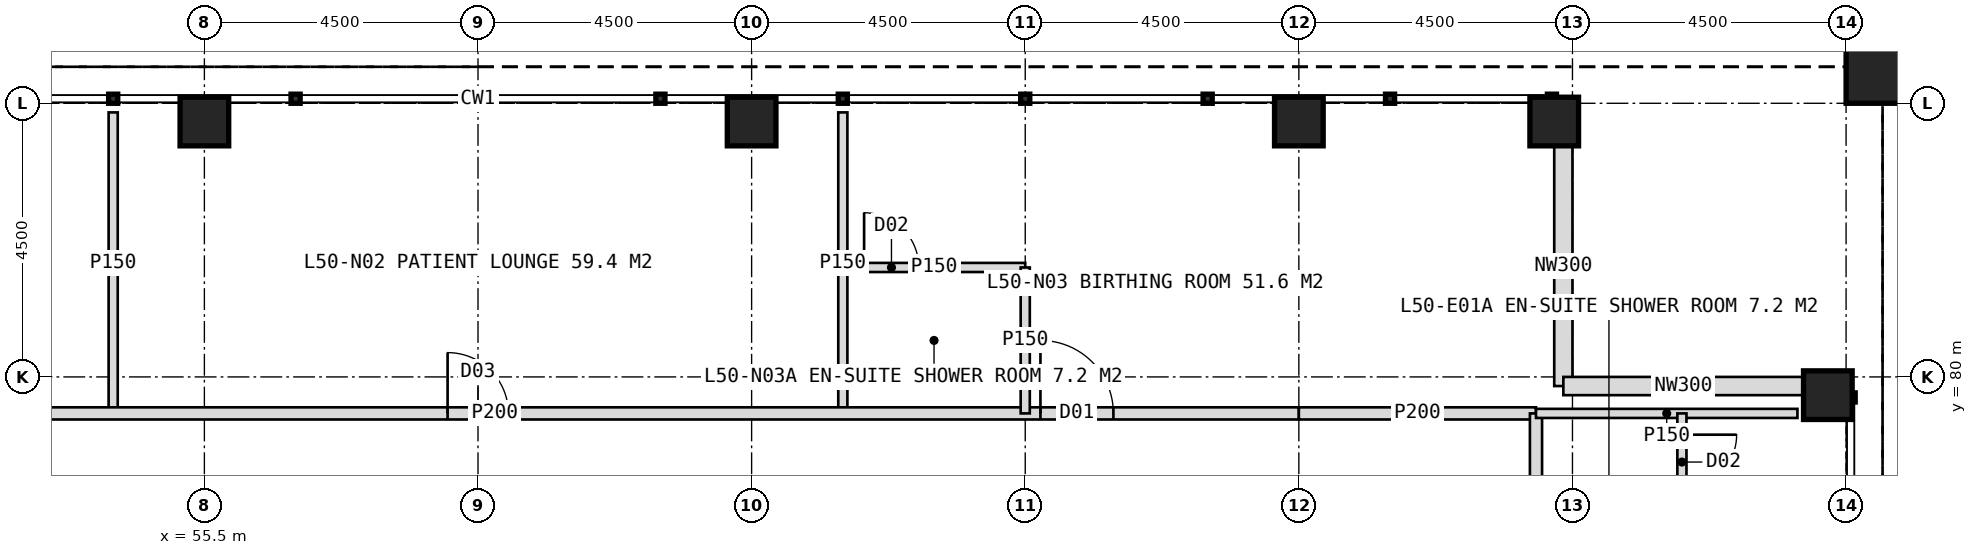
"""IFC4 building model, lengths in metres.
Left out: names, types, materials, properties, quantities, classifications, styles, units other than length and angle.
Written with IfcOpenShell. Run it as: python <this file> out.ifc"""

import sys

from ifc_helpers import new_model, si_unit, direction, frame, frame_2d, origin, origin_2d, place, context, subcontext, project, spatial, rectangle, hollow_rectangle, extrude, element, fill, save


model = new_model("IFC4")
c1 = context("Model", 3, precision=1e-05, world=origin(), true_north=direction((0.0, 1.0)))
c2 = subcontext(c1, "Body", "Model", "MODEL_VIEW")
j1 = project(units=[si_unit("LENGTHUNIT", "METRE"), si_unit("PLANEANGLEUNIT", "RADIAN")], contexts=[c1])
p1 = place(None, origin())
s1 = spatial("IfcSite", under=j1, at=p1, CompositionType="ELEMENT")
p2 = place(p1, origin())
s2 = spatial("IfcBuilding", under=s1, at=p2, CompositionType="ELEMENT")
p3 = place(p2, frame((0.0, 0.0, 209.0)))
s3 = spatial("IfcBuildingStorey", under=s2, at=p3, CompositionType="ELEMENT", Elevation=209.0)
for number, where, z_axis, x_axis in (
    (1, (55.5, 84.2, 0.0), (0.0, 0.0, 1.0), (1.0, 0.0, 0.0)),
    (2, (64.5, 84.2, 0.0), (0.0, 0.0, 1.0), (1.0, 0.0, 0.0)),
    (3, (73.5, 84.2, 0.0), (0.0, 0.0, 1.0), (1.0, 0.0, 0.0)),
    (4, (77.7, 84.2, 0.0), (0.0, 0.0, 1.0), (1.0, 0.0, 0.0)),
    (5, (82.2, 79.7, 0.0), (0.0, 0.0, 1.0), (1.0, 0.0, 0.0)),
):
    element("IfcColumn", number, at=place(p3, frame(where, z_axis=z_axis, x_axis=x_axis)), inside=s3, PredefinedType="COLUMN", context=c2, shape_type="SweptSolid", body=[
        extrude(hollow_rectangle(XDim=0.8, YDim=0.8, WallThickness=0.08, at=origin_2d()), origin(), (0.0, 0.0, 1.0), 4.0),
    ])
p4 = place(p3, frame((83.1, 85.1, 0.0), z_axis=(0.0, 0.0, 1.0), x_axis=(1.0, 0.0, 0.0)))
e6 = element("IfcColumn", 6, at=p4, inside=s3, PredefinedType="COLUMN", context=c2, shape_type="SweptSolid", body=[
    extrude(hollow_rectangle(XDim=1.2, YDim=1.2, WallThickness=0.07, at=origin_2d()), origin(), (0.0, 0.0, 1.0), 4.0),
])
for number, where, z_axis, x_axis in (
    (7, (77.85, 83.8, 0.0), (0.0, 0.0, 1.0), (0.0, -1.0, 0.0)),
    (8, (77.85, 79.85, 0.0), (0.0, 0.0, 1.0), (1.0, 0.0, 0.0)),
):
    element("IfcWall", number, at=place(p3, frame(where, z_axis=z_axis, x_axis=x_axis)), inside=s3, PredefinedType="ELEMENTEDWALL", context=c2, shape_type="SweptSolid", body=[
        extrude(rectangle(XDim=3.95, YDim=0.3, at=frame_2d((1.975, 0.0))), origin(), (0.0, 0.0, 1.0), 2.85),
    ])
for number, where, z_axis, x_axis in (
    (9, (54.0, 79.4, 0.0), (0.0, 0.0, 1.0), (0.0, 1.0, 0.0)),
    (10, (66.0, 79.4, 0.0), (0.0, 0.0, 1.0), (0.0, 1.0, 0.0)),
):
    element("IfcWall", number, at=place(p3, frame(where, z_axis=z_axis, x_axis=x_axis)), inside=s3, PredefinedType="PARTITIONING", context=c2, shape_type="SweptSolid", body=[
        extrude(rectangle(XDim=4.95, YDim=0.15, at=frame_2d((2.475, 0.0))), origin(), (0.0, 0.0, 1.0), 3.75),
    ])
p5 = place(p3, frame((47.05, 79.4, 0.0), z_axis=(0.0, 0.0, 1.0), x_axis=(1.0, 0.0, 0.0)))
e11 = element("IfcWall", 11, at=p5, inside=s3, PredefinedType="PARTITIONING", context=c2, shape_type="SweptSolid", body=[
    extrude(rectangle(XDim=26.45, YDim=0.2, at=frame_2d((13.225, 0.0))), origin(), (0.0, 0.0, 1.0), 3.75),
])
p6 = place(p5, frame((12.45, 0.0, 0.0)))
e12 = element("IfcOpeningElement", 12, at=p6, cuts=e11, PredefinedType="OPENING", context=c2, shape_type="SweptSolid", body=[
    extrude(rectangle(XDim=1.0, YDim=2.1, at=frame_2d((0.5, 1.05))), frame((0.0, 0.11, 0.0), z_axis=(0.0, -1.0, 0.0), x_axis=(1.0, 0.0, 0.0)), (0.0, 0.0, 1.0), 0.22),
])
p7 = place(p5, frame((22.2, 0.0, 0.0)))
e13 = element("IfcOpeningElement", 13, at=p7, cuts=e11, PredefinedType="OPENING", context=c2, shape_type="SweptSolid", body=[
    extrude(rectangle(XDim=1.2, YDim=2.2, at=frame_2d((0.6, 1.1))), frame((0.0, 0.11, 0.0), z_axis=(0.0, -1.0, 0.0), x_axis=(1.0, 0.0, 0.0)), (0.0, 0.0, 1.0), 0.22),
])
p8 = place(p3, frame((73.5, 79.4, 0.0), z_axis=(0.0, 0.0, 1.0), x_axis=(1.0, 0.0, 0.0)))
e14 = element("IfcWall", 14, at=p8, inside=s3, PredefinedType="PARTITIONING", context=c2, shape_type="SweptSolid", body=[
    extrude(rectangle(XDim=3.9, YDim=0.2, at=frame_2d((1.95, 0.0))), origin(), (0.0, 0.0, 1.0), 2.85),
])
p9 = place(p3, frame((66.0, 81.8, 0.0), z_axis=(0.0, 0.0, 1.0), x_axis=(1.0, 0.0, 0.0)))
e15 = element("IfcWall", 15, at=p9, inside=s3, PredefinedType="PARTITIONING", context=c2, shape_type="SweptSolid", body=[
    extrude(rectangle(XDim=3.0, YDim=0.15, at=frame_2d((1.5, 0.0))), origin(), (0.0, 0.0, 1.0), 3.75),
])
p10 = place(p9, frame((0.35, 0.0, 0.0)))
e16 = element("IfcOpeningElement", 16, at=p10, cuts=e15, PredefinedType="OPENING", context=c2, shape_type="SweptSolid", body=[
    extrude(rectangle(XDim=0.9, YDim=2.1, at=frame_2d((0.45, 1.05))), frame((0.0, 0.085, 0.0), z_axis=(0.0, -1.0, 0.0), x_axis=(1.0, 0.0, 0.0)), (0.0, 0.0, 1.0), 0.17),
])
p11 = place(p3, frame((69.0, 79.4, 0.0), z_axis=(0.0, 0.0, 1.0), x_axis=(0.0, 1.0, 0.0)))
e17 = element("IfcWall", 17, at=p11, inside=s3, PredefinedType="PARTITIONING", context=c2, shape_type="SweptSolid", body=[
    extrude(rectangle(XDim=2.4, YDim=0.15, at=frame_2d((1.2, 0.0))), origin(), (0.0, 0.0, 1.0), 3.75),
])
p12 = place(p3, frame((77.4, 79.4, 0.0), z_axis=(0.0, 0.0, 1.0), x_axis=(0.0, -1.0, 0.0)))
e18 = element("IfcWall", 18, at=p12, inside=s3, PredefinedType="PARTITIONING", context=c2, shape_type="SweptSolid", body=[
    extrude(rectangle(XDim=4.45, YDim=0.2, at=frame_2d((2.225, 0.0))), origin(), (0.0, 0.0, 1.0), 2.85),
])
p13 = place(p12, frame((3.25, 0.0, 0.0)))
e19 = element("IfcOpeningElement", 19, at=p13, cuts=e18, PredefinedType="OPENING", context=c2, shape_type="SweptSolid", body=[
    extrude(rectangle(XDim=1.2, YDim=2.2, at=frame_2d((0.6, 1.1))), frame((0.0, 0.11, 0.0), z_axis=(0.0, -1.0, 0.0), x_axis=(1.0, 0.0, 0.0)), (0.0, 0.0, 1.0), 0.22),
])
p14 = place(p3, frame((77.4, 79.4, 0.0), z_axis=(0.0, 0.0, 1.0), x_axis=(1.0, 0.0, 0.0)))
e20 = element("IfcWall", 20, at=p14, inside=s3, PredefinedType="PARTITIONING", context=c2, shape_type="SweptSolid", body=[
    extrude(rectangle(XDim=4.3, YDim=0.15, at=frame_2d((2.15, 0.0))), origin(), (0.0, 0.0, 1.0), 2.85),
])
p15 = place(p3, frame((79.8, 79.4, 0.0), z_axis=(0.0, 0.0, 1.0), x_axis=(0.0, -1.0, 0.0)))
e21 = element("IfcWall", 21, at=p15, inside=s3, PredefinedType="PARTITIONING", context=c2, shape_type="SweptSolid", body=[
    extrude(rectangle(XDim=3.0, YDim=0.15, at=frame_2d((1.5, 0.0))), origin(), (0.0, 0.0, 1.0), 3.75),
])
p16 = place(p15, frame((0.35, 0.0, 0.0)))
e22 = element("IfcOpeningElement", 22, at=p16, cuts=e21, PredefinedType="OPENING", context=c2, shape_type="SweptSolid", body=[
    extrude(rectangle(XDim=0.9, YDim=2.1, at=frame_2d((0.45, 1.05))), frame((0.0, 0.085, 0.0), z_axis=(0.0, -1.0, 0.0), x_axis=(1.0, 0.0, 0.0)), (0.0, 0.0, 1.0), 0.17),
])
p17 = place(p6, origin())
e23 = element("IfcDoor", 23, at=p17, inside=s3, OperationType="SINGLE_SWING_LEFT", PredefinedType="DOOR", context=c2, shape_type="SweptSolid", body=[
    extrude(rectangle(XDim=1.0, YDim=2.1, at=frame_2d((0.5, 1.05))), frame((0.0, 0.025, 0.0), z_axis=(0.0, -1.0, 0.0), x_axis=(1.0, 0.0, 0.0)), (0.0, 0.0, 1.0), 0.05),
])
fill(e12, e23)
p18 = place(p7, origin())
e24 = element("IfcDoor", 24, at=p18, inside=s3, OperationType="SINGLE_SWING_LEFT", PredefinedType="DOOR", context=c2, shape_type="SweptSolid", body=[
    extrude(rectangle(XDim=1.2, YDim=2.2, at=frame_2d((0.6, 1.1))), frame((0.0, 0.025, 0.0), z_axis=(0.0, -1.0, 0.0), x_axis=(1.0, 0.0, 0.0)), (0.0, 0.0, 1.0), 0.05),
])
fill(e13, e24)
p19 = place(p10, origin())
e25 = element("IfcDoor", 25, at=p19, inside=s3, OperationType="SINGLE_SWING_LEFT", PredefinedType="DOOR", context=c2, shape_type="SweptSolid", body=[
    extrude(rectangle(XDim=0.9, YDim=2.1, at=frame_2d((0.45, 1.05))), frame((0.0, 0.025, 0.0), z_axis=(0.0, -1.0, 0.0), x_axis=(1.0, 0.0, 0.0)), (0.0, 0.0, 1.0), 0.05),
])
fill(e16, e25)
p20 = place(p16, origin())
e26 = element("IfcDoor", 26, at=p20, inside=s3, OperationType="SINGLE_SWING_LEFT", PredefinedType="DOOR", context=c2, shape_type="SweptSolid", body=[
    extrude(rectangle(XDim=0.9, YDim=2.1, at=frame_2d((0.45, 1.05))), frame((0.0, 0.025, 0.0), z_axis=(0.0, -1.0, 0.0), x_axis=(1.0, 0.0, 0.0)), (0.0, 0.0, 1.0), 0.05),
])
fill(e22, e26)
save(model, sys.argv[1])
